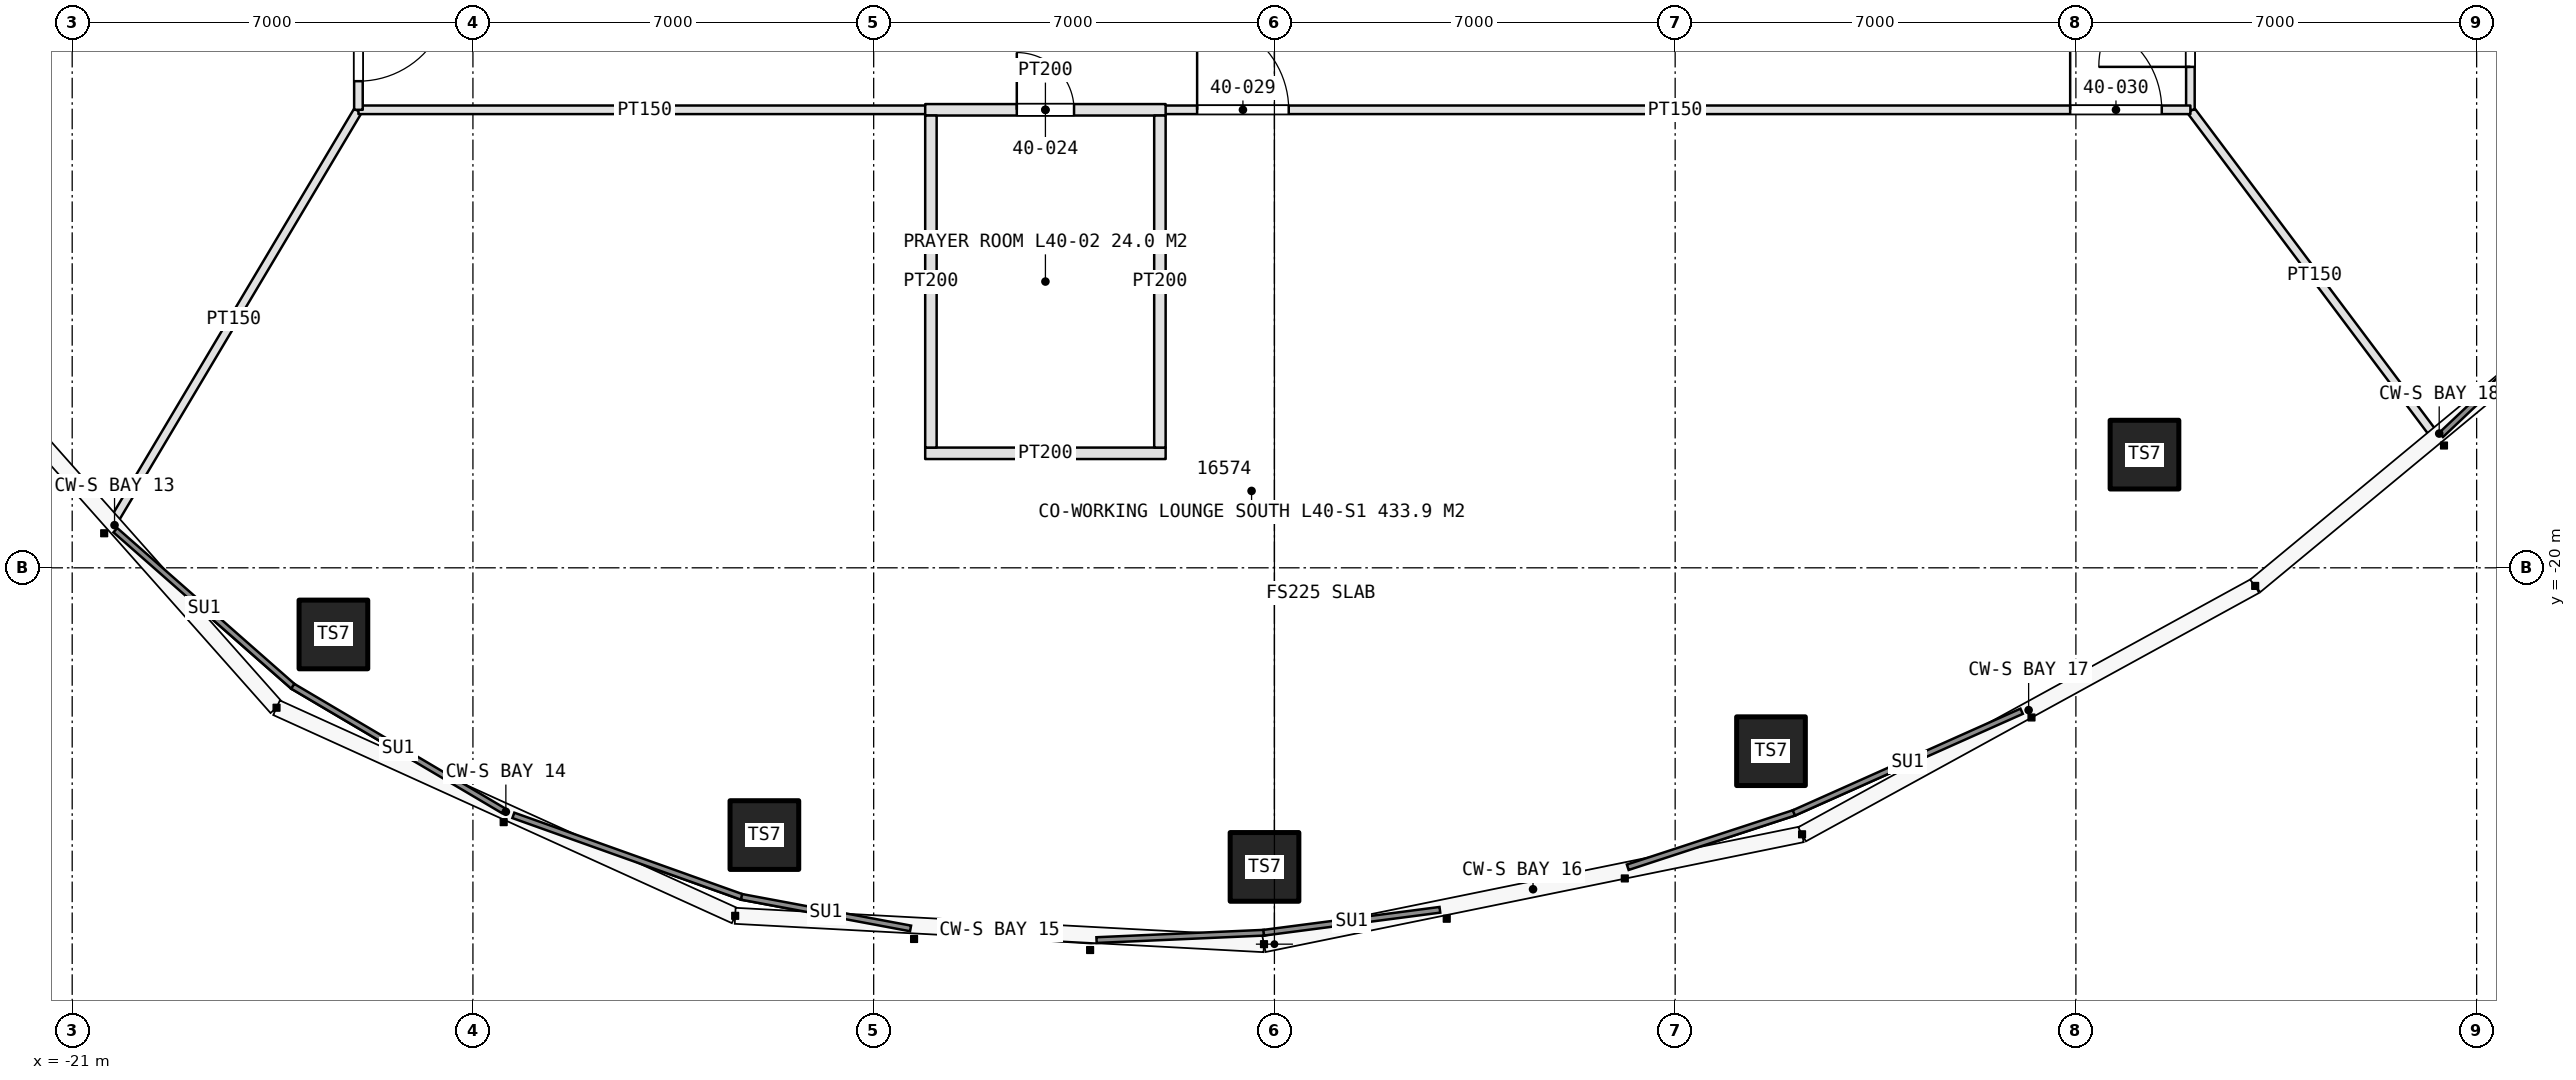
"""IFC4 building model, lengths in metres.
Left out: names, types, materials, properties, quantities, classifications, styles, units other than length and angle.
Written with IfcOpenShell. Run it as: python <this file> out.ifc"""

import sys

from ifc_helpers import new_model, si_unit, direction, frame, frame_2d, origin, origin_2d, place, context, subcontext, project, spatial, rectangle, hollow_rectangle, extrude, element, fill, save


model = new_model("IFC4")
c1 = context("Model", 3, precision=1e-05, world=origin(), true_north=direction((0.0, 1.0)))
c2 = subcontext(c1, "Body", "Model", "MODEL_VIEW")
j1 = project(units=[si_unit("LENGTHUNIT", "METRE"), si_unit("PLANEANGLEUNIT", "RADIAN")], contexts=[c1])
p1 = place(None, origin())
s1 = spatial("IfcSite", under=j1, at=p1, CompositionType="ELEMENT")
p2 = place(p1, origin())
s2 = spatial("IfcBuilding", under=s1, at=p2, CompositionType="ELEMENT")
p3 = place(p2, frame((0.0, 0.0, 184.8)))
s3 = spatial("IfcBuildingStorey", under=s2, at=p3, CompositionType="ELEMENT", Elevation=184.8)
for number, where, z_axis, x_axis in (
    (1, (-16.437, -21.164, 0.0), (0.0, 0.0, 1.0), (1.0, 0.0, 0.0)),
    (2, (-8.909, -24.668, 0.0), (0.0, 0.0, 1.0), (1.0, 0.0, 0.0)),
    (3, (-0.173, -25.224, 0.0), (0.0, 0.0, 1.0), (1.0, 0.0, 0.0)),
    (4, (8.674, -23.203, 0.0), (0.0, 0.0, 1.0), (1.0, 0.0, 0.0)),
):
    element("IfcColumn", number, at=place(p3, frame(where, z_axis=z_axis, x_axis=x_axis)), inside=s3, PredefinedType="COLUMN", context=c2, shape_type="SweptSolid", body=[
        extrude(hollow_rectangle(XDim=1.2, YDim=1.2, WallThickness=0.12, at=origin_2d()), origin(), (0.0, 0.0, 1.0), 4.225),
    ])
p4 = place(p3, frame((15.198, -18.023, 0.0), z_axis=(0.0, 0.0, 1.0), x_axis=(1.0, 0.0, 0.0)))
e5 = element("IfcColumn", 5, at=p4, inside=s3, PredefinedType="COLUMN", context=c2, shape_type="SweptSolid", body=[
    extrude(hollow_rectangle(XDim=1.2, YDim=1.2, WallThickness=0.12, at=origin_2d()), origin(), (0.0, 0.0, 1.0), 5.0),
])
p5 = place(p3, frame((-16.01, -12.017, 0.0), z_axis=(0.0, 0.0, 1.0), x_axis=(-0.511508688443, -0.85927810495, 0.0)))
e6 = element("IfcWall", 6, at=p5, inside=s3, PredefinedType="PARTITIONING", context=c2, shape_type="SweptSolid", body=[
    extrude(rectangle(XDim=8.47, YDim=0.15, at=frame_2d((4.235, 0.0))), origin(), (0.0, 0.0, 1.0), 3.6),
])
p6 = place(p3, frame((16.012, -12.016, 0.0), z_axis=(0.0, 0.0, 1.0), x_axis=(0.600059749679, -0.799955184254, 0.0)))
e7 = element("IfcWall", 7, at=p6, inside=s3, PredefinedType="PARTITIONING", context=c2, shape_type="SweptSolid", body=[
    extrude(rectangle(XDim=7.191, YDim=0.15, at=frame_2d((3.596, 0.0))), origin(), (0.0, 0.0, 1.0), 3.6),
])
p7 = place(p3, frame((16.0, -12.0, 0.0), z_axis=(0.0, 0.0, 1.0), x_axis=(0.0, 1.0, 0.0)))
e8 = element("IfcWall", 8, at=p7, inside=s3, PredefinedType="PARTITIONING", context=c2, shape_type="SweptSolid", body=[
    extrude(rectangle(XDim=24.0, YDim=0.15, at=frame_2d((12.0, 0.0))), origin(), (0.0, 0.0, 1.0), 3.6),
])
p8 = place(p7, frame((12.4, 0.0, 0.0)))
e9 = element("IfcOpeningElement", 9, at=p8, cuts=e8, PredefinedType="OPENING", context=c2, shape_type="SweptSolid", body=[
    extrude(rectangle(XDim=1.6, YDim=2.4, at=frame_2d((0.8, 1.2))), frame((0.0, 0.085, 0.0), z_axis=(0.0, -1.0, 0.0), x_axis=(1.0, 0.0, 0.0)), (0.0, 0.0, 1.0), 0.17),
])
p9 = place(p7, frame((0.75, 0.0, 0.0)))
e10 = element("IfcOpeningElement", 10, at=p9, cuts=e8, PredefinedType="OPENING", context=c2, shape_type="SweptSolid", body=[
    extrude(rectangle(XDim=1.6, YDim=2.4, at=frame_2d((0.8, 1.2))), frame((0.0, 0.085, 0.0), z_axis=(0.0, -1.0, 0.0), x_axis=(1.0, 0.0, 0.0)), (0.0, 0.0, 1.0), 0.17),
])
p10 = place(p3, frame((-16.0, -12.0, 0.0), z_axis=(0.0, 0.0, 1.0), x_axis=(1.0, 0.0, 0.0)))
e11 = element("IfcWall", 11, at=p10, inside=s3, PredefinedType="PARTITIONING", context=c2, shape_type="SweptSolid", body=[
    extrude(rectangle(XDim=10.0, YDim=0.15, at=frame_2d((5.0, 0.0))), origin(), (0.0, 0.0, 1.0), 3.6),
])
p11 = place(p3, frame((-2.0, -12.0, 0.0), z_axis=(0.0, 0.0, 1.0), x_axis=(1.0, 0.0, 0.0)))
e12 = element("IfcWall", 12, at=p11, inside=s3, PredefinedType="PARTITIONING", context=c2, shape_type="SweptSolid", body=[
    extrude(rectangle(XDim=18.0, YDim=0.15, at=frame_2d((9.0, 0.0))), origin(), (0.0, 0.0, 1.0), 3.6),
])
p12 = place(p11, frame((0.65, 0.0, 0.0)))
e13 = element("IfcOpeningElement", 13, at=p12, cuts=e12, PredefinedType="OPENING", context=c2, shape_type="SweptSolid", body=[
    extrude(rectangle(XDim=1.6, YDim=2.4, at=frame_2d((0.8, 1.2))), frame((0.0, 0.085, 0.0), z_axis=(0.0, -1.0, 0.0), x_axis=(1.0, 0.0, 0.0)), (0.0, 0.0, 1.0), 0.17),
])
p13 = place(p11, frame((15.9, 0.0, 0.0)))
e14 = element("IfcOpeningElement", 14, at=p13, cuts=e12, PredefinedType="OPENING", context=c2, shape_type="SweptSolid", body=[
    extrude(rectangle(XDim=1.6, YDim=2.4, at=frame_2d((0.8, 1.2))), frame((0.0, 0.085, 0.0), z_axis=(0.0, -1.0, 0.0), x_axis=(1.0, 0.0, 0.0)), (0.0, 0.0, 1.0), 0.17),
])
p14 = place(p3, frame((-16.0, 12.0, 0.0), z_axis=(0.0, 0.0, 1.0), x_axis=(0.0, -1.0, 0.0)))
e15 = element("IfcWall", 15, at=p14, inside=s3, PredefinedType="PARTITIONING", context=c2, shape_type="SweptSolid", body=[
    extrude(rectangle(XDim=24.0, YDim=0.15, at=frame_2d((12.0, 0.0))), origin(), (0.0, 0.0, 1.0), 3.6),
])
p15 = place(p14, frame((9.9, 0.0, 0.0)))
e16 = element("IfcOpeningElement", 16, at=p15, cuts=e15, PredefinedType="OPENING", context=c2, shape_type="SweptSolid", body=[
    extrude(rectangle(XDim=1.6, YDim=2.4, at=frame_2d((0.8, 1.2))), frame((0.0, 0.085, 0.0), z_axis=(0.0, -1.0, 0.0), x_axis=(1.0, 0.0, 0.0)), (0.0, 0.0, 1.0), 0.17),
])
p16 = place(p14, frame((21.9, 0.0, 0.0)))
e17 = element("IfcOpeningElement", 17, at=p16, cuts=e15, PredefinedType="OPENING", context=c2, shape_type="SweptSolid", body=[
    extrude(rectangle(XDim=1.6, YDim=2.4, at=frame_2d((0.8, 1.2))), frame((0.0, 0.085, 0.0), z_axis=(0.0, -1.0, 0.0), x_axis=(1.0, 0.0, 0.0)), (0.0, 0.0, 1.0), 0.17),
])
p17 = place(p3, frame((-6.1, -18.0, 0.0), z_axis=(0.0, 0.0, 1.0), x_axis=(1.0, 0.0, 0.0)))
e18 = element("IfcWall", 18, at=p17, inside=s3, PredefinedType="PARTITIONING", context=c2, shape_type="SweptSolid", body=[
    extrude(rectangle(XDim=4.2, YDim=0.2, at=frame_2d((2.1, 0.0))), origin(), (0.0, 0.0, 1.0), 3.6),
])
p18 = place(p3, frame((-6.1, -12.0, 0.0), z_axis=(0.0, 0.0, 1.0), x_axis=(1.0, 0.0, 0.0)))
e19 = element("IfcWall", 19, at=p18, inside=s3, PredefinedType="PARTITIONING", context=c2, shape_type="SweptSolid", body=[
    extrude(rectangle(XDim=4.2, YDim=0.2, at=frame_2d((2.1, 0.0))), origin(), (0.0, 0.0, 1.0), 3.6),
])
p19 = place(p18, frame((1.6, 0.0, 0.0)))
e20 = element("IfcOpeningElement", 20, at=p19, cuts=e19, PredefinedType="OPENING", context=c2, shape_type="SweptSolid", body=[
    extrude(rectangle(XDim=1.0, YDim=2.2, at=frame_2d((0.5, 1.1))), frame((0.0, 0.11, 0.0), z_axis=(0.0, -1.0, 0.0), x_axis=(1.0, 0.0, 0.0)), (0.0, 0.0, 1.0), 0.22),
])
for number, where, z_axis, x_axis in (
    (21, (-6.0, -17.9, 0.0), (0.0, 0.0, 1.0), (0.0, 1.0, 0.0)),
    (22, (-2.0, -17.9, 0.0), (0.0, 0.0, 1.0), (0.0, 1.0, 0.0)),
):
    element("IfcWall", number, at=place(p3, frame(where, z_axis=z_axis, x_axis=x_axis)), inside=s3, PredefinedType="PARTITIONING", context=c2, shape_type="SweptSolid", body=[
        extrude(rectangle(XDim=5.8, YDim=0.2, at=frame_2d((2.9, 0.0))), origin(), (0.0, 0.0, 1.0), 3.6),
    ])
p20 = place(p19, origin())
e23 = element("IfcDoor", 23, at=p20, inside=s3, OperationType="SINGLE_SWING_LEFT", PredefinedType="DOOR", context=c2, shape_type="SweptSolid", body=[
    extrude(rectangle(XDim=1.0, YDim=2.2, at=frame_2d((0.5, 1.1))), frame((0.0, 0.025, 0.0), z_axis=(0.0, -1.0, 0.0), x_axis=(1.0, 0.0, 0.0)), (0.0, 0.0, 1.0), 0.05),
])
fill(e20, e23)
p21 = place(p9, origin())
e24 = element("IfcDoor", 24, at=p21, inside=s3, OperationType="DOUBLE_DOOR_SINGLE_SWING", PredefinedType="DOOR", context=c2, shape_type="SweptSolid", body=[
    extrude(rectangle(XDim=1.6, YDim=2.4, at=frame_2d((0.8, 1.2))), frame((0.0, 0.025, 0.0), z_axis=(0.0, -1.0, 0.0), x_axis=(1.0, 0.0, 0.0)), (0.0, 0.0, 1.0), 0.05),
])
fill(e10, e24)
p22 = place(p12, origin())
e25 = element("IfcDoor", 25, at=p22, inside=s3, OperationType="DOUBLE_DOOR_SINGLE_SWING", PredefinedType="DOOR", context=c2, shape_type="SweptSolid", body=[
    extrude(rectangle(XDim=1.6, YDim=2.4, at=frame_2d((0.8, 1.2))), frame((0.0, 0.025, 0.0), z_axis=(0.0, -1.0, 0.0), x_axis=(1.0, 0.0, 0.0)), (0.0, 0.0, 1.0), 0.05),
])
fill(e13, e25)
p23 = place(p13, origin())
e26 = element("IfcDoor", 26, at=p23, inside=s3, OperationType="DOUBLE_DOOR_SINGLE_SWING", PredefinedType="DOOR", context=c2, shape_type="SweptSolid", body=[
    extrude(rectangle(XDim=1.6, YDim=2.4, at=frame_2d((0.8, 1.2))), frame((0.0, 0.025, 0.0), z_axis=(0.0, -1.0, 0.0), x_axis=(1.0, 0.0, 0.0)), (0.0, 0.0, 1.0), 0.05),
])
fill(e14, e26)
p24 = place(p16, origin())
e27 = element("IfcDoor", 27, at=p24, inside=s3, OperationType="DOUBLE_DOOR_SINGLE_SWING", PredefinedType="DOOR", context=c2, shape_type="SweptSolid", body=[
    extrude(rectangle(XDim=1.6, YDim=2.4, at=frame_2d((0.8, 1.2))), frame((0.0, 0.025, 0.0), z_axis=(0.0, -1.0, 0.0), x_axis=(1.0, 0.0, 0.0)), (0.0, 0.0, 1.0), 0.05),
])
fill(e17, e27)
save(model, sys.argv[1])
